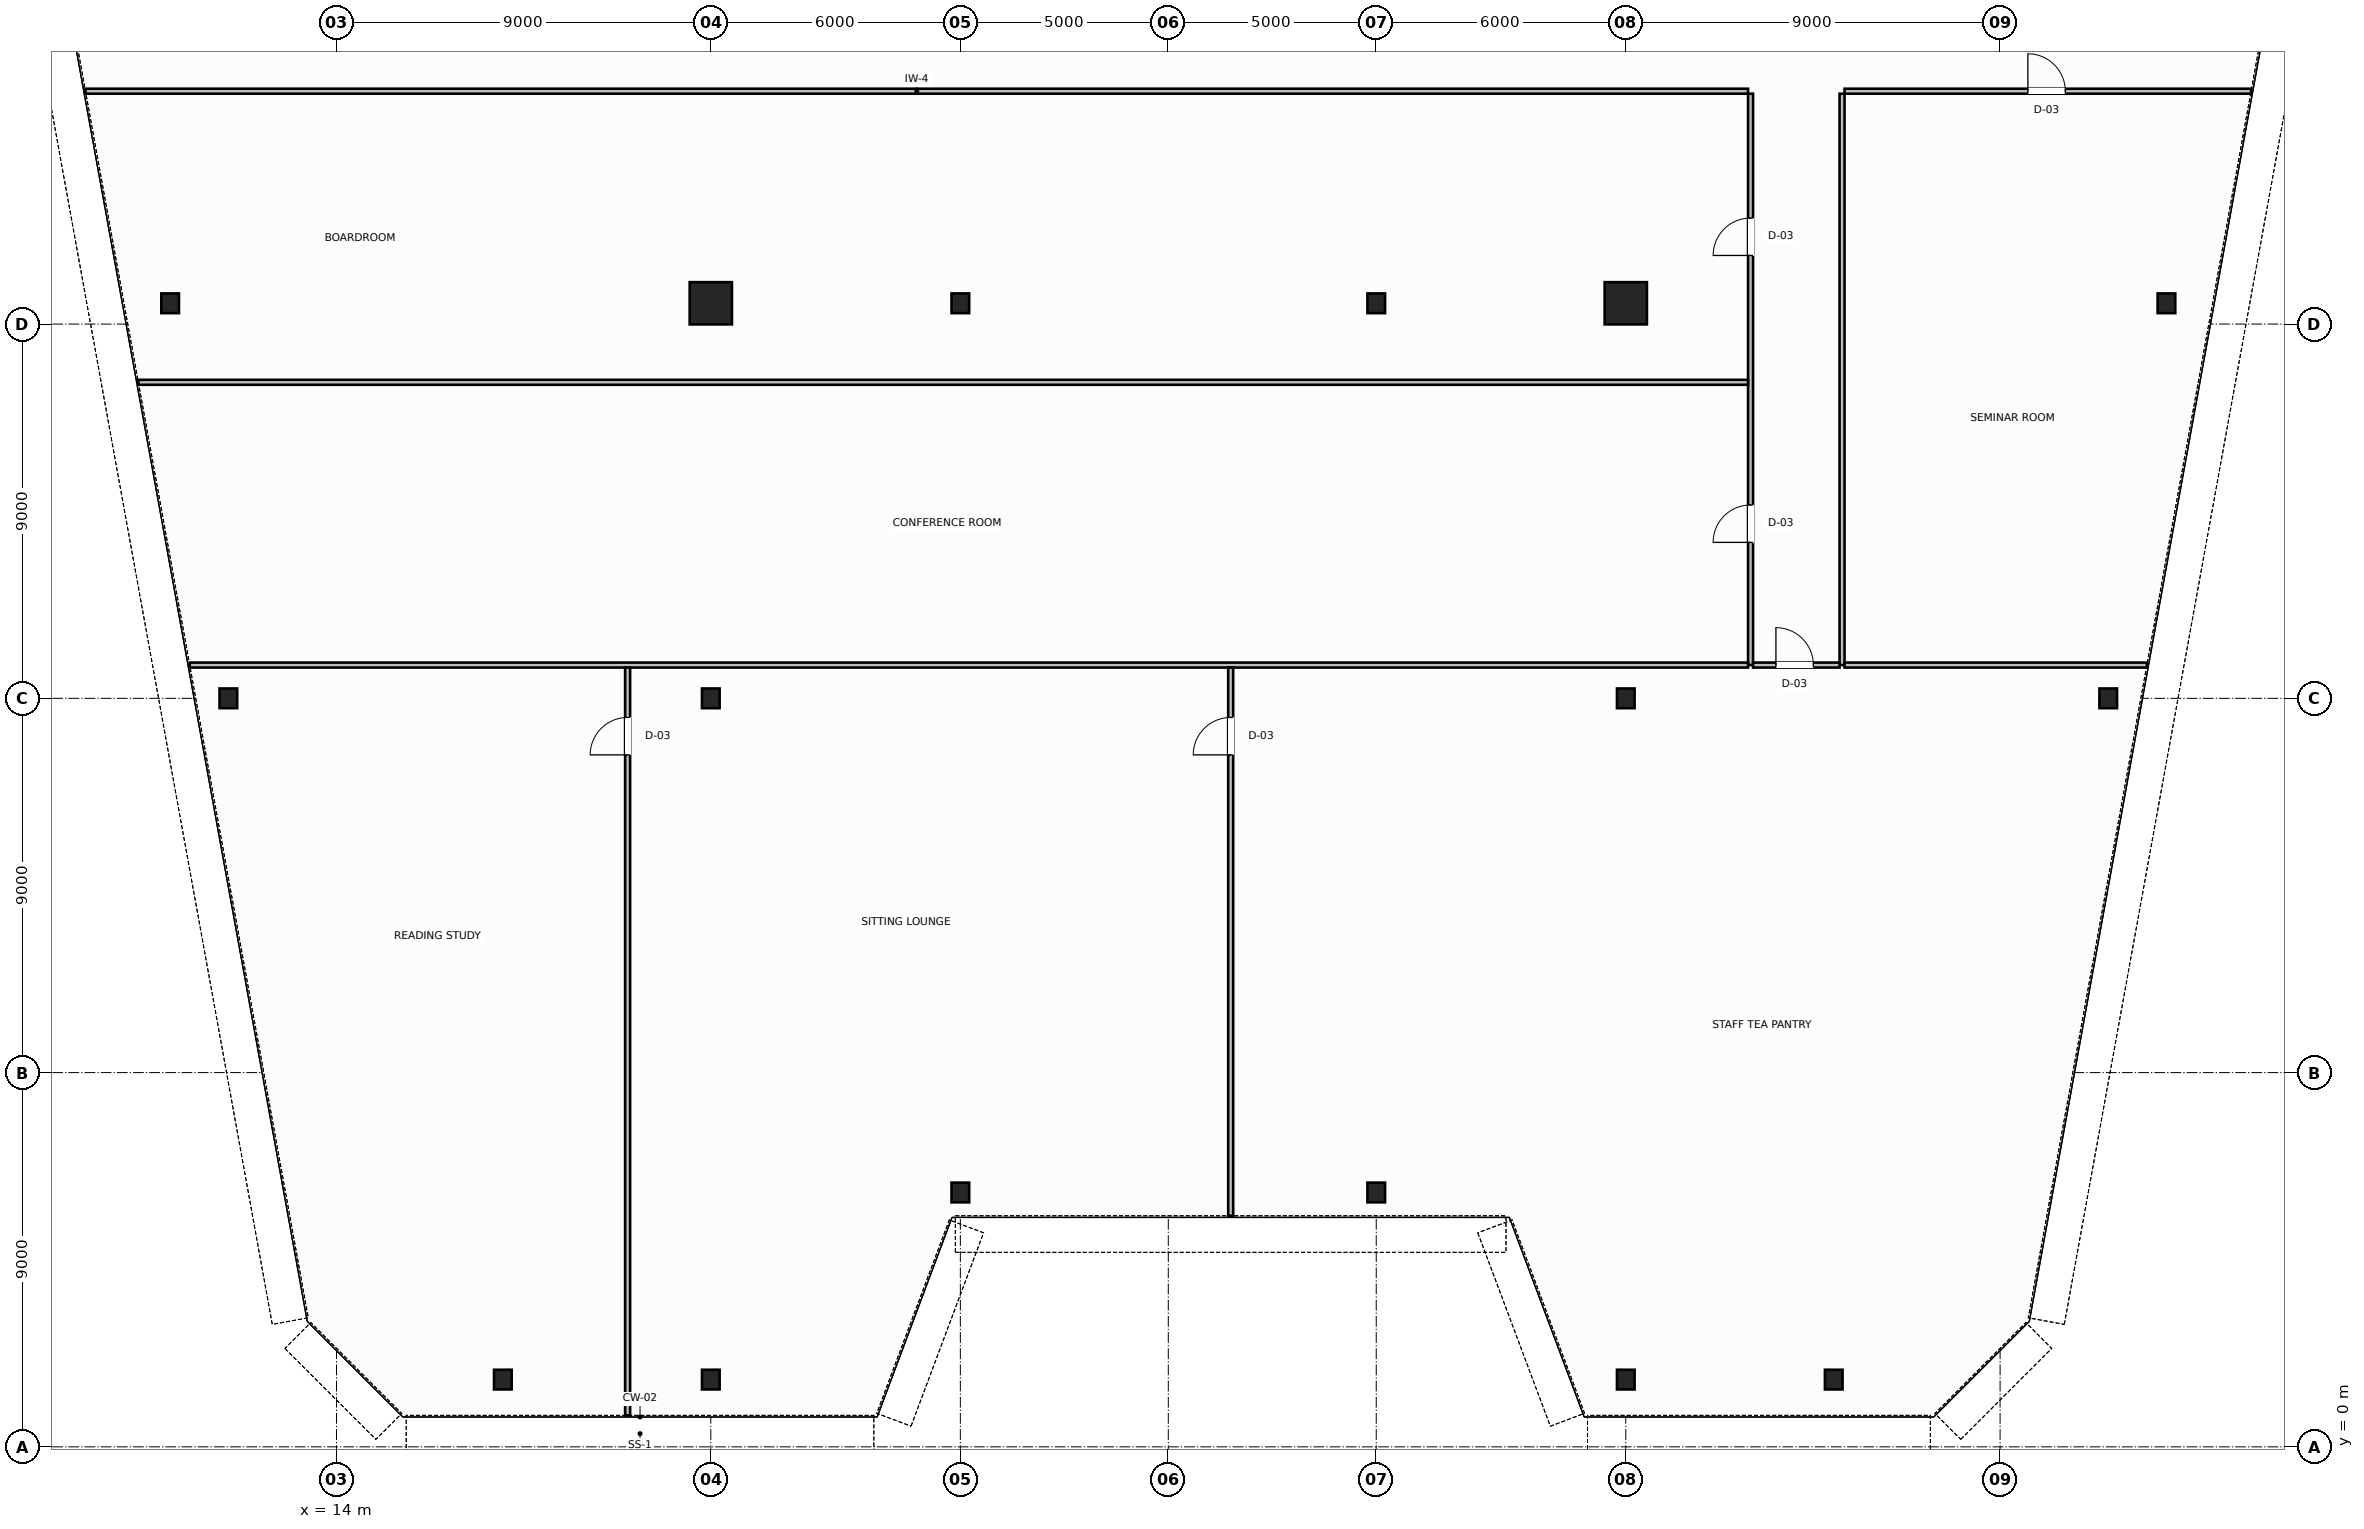
"""IFC4 building model, lengths in metres.
Left out: names, types, materials, properties, quantities, classifications, styles, units other than length and angle.
Written with IfcOpenShell. Run it as: python <this file> out.ifc"""

import sys

from ifc_helpers import new_model, si_unit, direction, frame, frame_2d, origin, origin_2d, place, context, subcontext, project, spatial, rectangle, hollow_circle, i_section, extrude, source, transform, mapped, element, fill, save


model = new_model("IFC4")
c1 = context("Model", 3, precision=1e-05, world=origin(), true_north=direction((0.0, 1.0)))
c2 = subcontext(c1, "Body", "Model", "MODEL_VIEW")
j1 = project(units=[si_unit("LENGTHUNIT", "METRE"), si_unit("PLANEANGLEUNIT", "RADIAN")], contexts=[c1])
p1 = place(None, origin())
s1 = spatial("IfcSite", under=j1, at=p1, CompositionType="ELEMENT")
p2 = place(p1, origin())
s2 = spatial("IfcBuilding", under=s1, at=p2, CompositionType="ELEMENT")
p3 = place(p2, frame((0.0, 0.0, 133.8)))
s3 = spatial("IfcBuildingStorey", under=s2, at=p3, CompositionType="ELEMENT", Elevation=133.8)
m1 = source(origin(), c2, "Body", "SweptSolid", [
    extrude(i_section(OverallWidth=0.424, OverallDepth=0.474, WebThickness=0.047, FlangeThickness=0.065, FilletRadius=0.015, at=origin_2d()), origin(), (0.0, 0.0, 1.0), 3.8),
])
for number, where, z_axis, x_axis in (
    (1, (10.0, 27.5, 0.0), (0.0, 0.0, 1.0), (1.0, 0.0, 0.0)),
    (2, (11.4, 18.0, 0.0), (0.0, 0.0, 1.0), (1.0, 0.0, 0.0)),
    (3, (58.0, 27.5, 0.0), (0.0, 0.0, 1.0), (1.0, 0.0, 0.0)),
    (4, (56.6, 18.0, 0.0), (0.0, 0.0, 1.0), (1.0, 0.0, 0.0)),
):
    element("IfcColumn", number, at=place(p3, frame(where, z_axis=z_axis, x_axis=x_axis)), inside=s3, PredefinedType="COLUMN", context=c2, shape_type="MappedRepresentation", body=[
        mapped(m1, transform((0.0, 0.0, 0.0), scale=1.0)),
    ])
m2 = source(origin(), c2, "Body", "SweptSolid", [
    extrude(hollow_circle(Radius=0.508, WallThickness=0.045, at=origin_2d()), origin(), (0.0, 0.0, 1.0), 3.8),
])
p4 = place(p3, frame((23.0, 27.5, 0.0), z_axis=(0.0, 0.0, 1.0), x_axis=(1.0, 0.0, 0.0)))
e5 = element("IfcColumn", 5, at=p4, inside=s3, PredefinedType="COLUMN", context=c2, shape_type="MappedRepresentation", body=[
    mapped(m2, transform((0.0, 0.0, 0.0), scale=1.0)),
])
m3 = source(origin(), c2, "Body", "SweptSolid", [
    extrude(i_section(OverallWidth=0.424, OverallDepth=0.474, WebThickness=0.047, FlangeThickness=0.065, FilletRadius=0.015, at=origin_2d()), origin(), (0.0, 0.0, 1.0), 3.8),
])
for number, where, z_axis, x_axis in (
    (6, (29.0, 27.5, 0.0), (0.0, 0.0, 1.0), (1.0, 0.0, 0.0)),
    (7, (39.0, 27.5, 0.0), (0.0, 0.0, 1.0), (1.0, 0.0, 0.0)),
):
    element("IfcColumn", number, at=place(p3, frame(where, z_axis=z_axis, x_axis=x_axis)), inside=s3, PredefinedType="COLUMN", context=c2, shape_type="MappedRepresentation", body=[
        mapped(m3, transform((0.0, 0.0, 0.0), scale=1.0)),
    ])
p5 = place(p3, frame((45.0, 27.5, 0.0), z_axis=(0.0, 0.0, 1.0), x_axis=(1.0, 0.0, 0.0)))
e8 = element("IfcColumn", 8, at=p5, inside=s3, PredefinedType="COLUMN", context=c2, shape_type="MappedRepresentation", body=[
    mapped(m2, transform((0.0, 0.0, 0.0), scale=1.0)),
])
for number, where, z_axis, x_axis in (
    (9, (23.0, 18.0, 0.0), (0.0, 0.0, 1.0), (1.0, 0.0, 0.0)),
    (10, (45.0, 18.0, 0.0), (0.0, 0.0, 1.0), (1.0, 0.0, 0.0)),
):
    element("IfcColumn", number, at=place(p3, frame(where, z_axis=z_axis, x_axis=x_axis)), inside=s3, PredefinedType="COLUMN", context=c2, shape_type="MappedRepresentation", body=[
        mapped(m3, transform((0.0, 0.0, 0.0), scale=1.0)),
    ])
m4 = source(origin(), c2, "Body", "SweptSolid", [
    extrude(i_section(OverallWidth=0.424, OverallDepth=0.474, WebThickness=0.047, FlangeThickness=0.065, FilletRadius=0.015, at=origin_2d()), origin(), (0.0, 0.0, 1.0), 3.744),
])
for number, where, z_axis, x_axis in (
    (11, (18.0, 1.617, 0.032), (0.0, -0.064, 0.998), (1.0, 0.0, 0.0)),
    (12, (23.0, 1.617, 0.032), (0.0, -0.064, 0.998), (1.0, 0.0, 0.0)),
    (13, (29.0, 6.117, 0.032), (0.0, -0.064, 0.998), (1.0, 0.0, 0.0)),
    (14, (39.0, 6.117, 0.032), (0.0, -0.064, 0.998), (1.0, 0.0, 0.0)),
    (15, (45.0, 1.617, 0.032), (0.0, -0.064, 0.998), (1.0, 0.0, 0.0)),
    (16, (50.0, 1.617, 0.032), (0.0, -0.064, 0.998), (1.0, 0.0, 0.0)),
):
    element("IfcColumn", number, at=place(p3, frame(where, z_axis=z_axis, x_axis=x_axis)), inside=s3, PredefinedType="COLUMN", context=c2, shape_type="MappedRepresentation", body=[
        mapped(m4, transform((0.0, 0.0, 0.0), scale=1.0)),
    ])
p6 = place(p3, frame((7.964, 32.6, 0.0), z_axis=(0.0, 0.0, 1.0), x_axis=(1.0, 0.0, 0.0)))
e17 = element("IfcWall", 17, at=p6, inside=s3, PredefinedType="PARTITIONING", context=c2, shape_type="SweptSolid", body=[
    extrude(rectangle(XDim=39.976, YDim=0.12, at=frame_2d((19.988, 0.0))), origin(), (0.0, 0.0, 1.0), 3.58),
])
p7 = place(p3, frame((50.26, 32.6, 0.0), z_axis=(0.0, 0.0, 1.0), x_axis=(1.0, 0.0, 0.0)))
e18 = element("IfcWall", 18, at=p7, inside=s3, PredefinedType="PARTITIONING", context=c2, shape_type="SweptSolid", body=[
    extrude(rectangle(XDim=9.776, YDim=0.12, at=frame_2d((4.888, 0.0))), origin(), (0.0, 0.0, 1.0), 3.58),
])
p8 = place(p7, frame((4.408, 0.0, 0.0)))
e19 = element("IfcOpeningElement", 19, at=p8, cuts=e18, PredefinedType="OPENING", context=c2, shape_type="SweptSolid", body=[
    extrude(rectangle(XDim=0.9, YDim=2.15, at=frame_2d((0.45, 1.075))), frame((0.0, 0.07, 0.0), z_axis=(0.0, -1.0, 0.0), x_axis=(1.0, 0.0, 0.0)), (0.0, 0.0, 1.0), 0.14),
])
p9 = place(p3, frame((48.0, 18.8, 0.0), z_axis=(0.0, 0.0, 1.0), x_axis=(0.0, 1.0, 0.0)))
e20 = element("IfcWall", 20, at=p9, inside=s3, PredefinedType="PARTITIONING", context=c2, shape_type="SweptSolid", body=[
    extrude(rectangle(XDim=13.74, YDim=0.12, at=frame_2d((6.87, 0.0))), origin(), (0.0, 0.0, 1.0), 3.58),
])
p10 = place(p9, frame((2.95, 0.0, 0.0)))
e21 = element("IfcOpeningElement", 21, at=p10, cuts=e20, PredefinedType="OPENING", context=c2, shape_type="SweptSolid", body=[
    extrude(rectangle(XDim=0.9, YDim=2.15, at=frame_2d((0.45, 1.075))), frame((0.0, 0.07, 0.0), z_axis=(0.0, -1.0, 0.0), x_axis=(1.0, 0.0, 0.0)), (0.0, 0.0, 1.0), 0.14),
])
p11 = place(p9, frame((9.85, 0.0, 0.0)))
e22 = element("IfcOpeningElement", 22, at=p11, cuts=e20, PredefinedType="OPENING", context=c2, shape_type="SweptSolid", body=[
    extrude(rectangle(XDim=0.9, YDim=2.15, at=frame_2d((0.45, 1.075))), frame((0.0, 0.07, 0.0), z_axis=(0.0, -1.0, 0.0), x_axis=(1.0, 0.0, 0.0)), (0.0, 0.0, 1.0), 0.14),
])
p12 = place(p3, frame((50.2, 18.8, 0.0), z_axis=(0.0, 0.0, 1.0), x_axis=(0.0, 1.0, 0.0)))
e23 = element("IfcWall", 23, at=p12, inside=s3, PredefinedType="PARTITIONING", context=c2, shape_type="SweptSolid", body=[
    extrude(rectangle(XDim=13.74, YDim=0.12, at=frame_2d((6.87, 0.0))), origin(), (0.0, 0.0, 1.0), 3.58),
])
p13 = place(p3, frame((48.06, 18.8, 0.0), z_axis=(0.0, 0.0, 1.0), x_axis=(1.0, 0.0, 0.0)))
e24 = element("IfcWall", 24, at=p13, inside=s3, PredefinedType="PARTITIONING", context=c2, shape_type="SweptSolid", body=[
    extrude(rectangle(XDim=2.08, YDim=0.12, at=frame_2d((1.04, 0.0))), origin(), (0.0, 0.0, 1.0), 3.58),
])
p14 = place(p13, frame((0.55, 0.0, 0.0)))
e25 = element("IfcOpeningElement", 25, at=p14, cuts=e24, PredefinedType="OPENING", context=c2, shape_type="SweptSolid", body=[
    extrude(rectangle(XDim=0.9, YDim=2.15, at=frame_2d((0.45, 1.075))), frame((0.0, 0.07, 0.0), z_axis=(0.0, -1.0, 0.0), x_axis=(1.0, 0.0, 0.0)), (0.0, 0.0, 1.0), 0.14),
])
p15 = place(p3, frame((10.47, 18.8, 0.0), z_axis=(0.0, 0.0, 1.0), x_axis=(1.0, 0.0, 0.0)))
e26 = element("IfcWall", 26, at=p15, inside=s3, PredefinedType="PARTITIONING", context=c2, shape_type="SweptSolid", body=[
    extrude(rectangle(XDim=37.47, YDim=0.12, at=frame_2d((18.735, 0.0))), origin(), (0.0, 0.0, 1.0), 3.58),
])
p16 = place(p3, frame((50.26, 18.8, 0.0), z_axis=(0.0, 0.0, 1.0), x_axis=(1.0, 0.0, 0.0)))
e27 = element("IfcWall", 27, at=p16, inside=s3, PredefinedType="PARTITIONING", context=c2, shape_type="SweptSolid", body=[
    extrude(rectangle(XDim=7.27, YDim=0.12, at=frame_2d((3.635, 0.0))), origin(), (0.0, 0.0, 1.0), 3.58),
])
p17 = place(p3, frame((21.0, 0.757, 0.0), z_axis=(0.0, 0.0, 1.0), x_axis=(0.0, 1.0, 0.0)))
e28 = element("IfcWall", 28, at=p17, inside=s3, PredefinedType="PARTITIONING", context=c2, shape_type="SweptSolid", body=[
    extrude(rectangle(XDim=17.983, YDim=0.12, at=frame_2d((8.991, 0.0))), origin(), (0.0, 0.0, 1.0), 3.58),
])
p18 = place(p17, frame((15.883, 0.0, 0.0)))
e29 = element("IfcOpeningElement", 29, at=p18, cuts=e28, PredefinedType="OPENING", context=c2, shape_type="SweptSolid", body=[
    extrude(rectangle(XDim=0.9, YDim=2.15, at=frame_2d((0.45, 1.075))), frame((0.0, 0.07, 0.0), z_axis=(0.0, -1.0, 0.0), x_axis=(1.0, 0.0, 0.0)), (0.0, 0.0, 1.0), 0.14),
])
p19 = place(p3, frame((35.5, 5.557, 0.0), z_axis=(0.0, 0.0, 1.0), x_axis=(0.0, 1.0, 0.0)))
e30 = element("IfcWall", 30, at=p19, inside=s3, PredefinedType="PARTITIONING", context=c2, shape_type="SweptSolid", body=[
    extrude(rectangle(XDim=13.183, YDim=0.12, at=frame_2d((6.591, 0.0))), origin(), (0.0, 0.0, 1.0), 3.58),
])
p20 = place(p19, frame((11.083, 0.0, 0.0)))
e31 = element("IfcOpeningElement", 31, at=p20, cuts=e30, PredefinedType="OPENING", context=c2, shape_type="SweptSolid", body=[
    extrude(rectangle(XDim=0.9, YDim=2.15, at=frame_2d((0.45, 1.075))), frame((0.0, 0.07, 0.0), z_axis=(0.0, -1.0, 0.0), x_axis=(1.0, 0.0, 0.0)), (0.0, 0.0, 1.0), 0.14),
])
p21 = place(p3, frame((9.235, 25.6, 0.0), z_axis=(0.0, 0.0, 1.0), x_axis=(1.0, 0.0, 0.0)))
e32 = element("IfcWall", 32, at=p21, inside=s3, PredefinedType="PARTITIONING", context=c2, shape_type="SweptSolid", body=[
    extrude(rectangle(XDim=38.705, YDim=0.12, at=frame_2d((19.352, 0.0))), origin(), (0.0, 0.0, 1.0), 3.58),
])
m5 = source(origin(), c2, "Body", "SweptSolid", [
    extrude(rectangle(XDim=0.9, YDim=2.15, at=frame_2d((0.45, 1.075))), frame((0.0, 0.025, 0.0), z_axis=(0.0, -1.0, 0.0), x_axis=(1.0, 0.0, 0.0)), (0.0, 0.0, 1.0), 0.05),
])
p22 = place(p18, origin())
e33 = element("IfcDoor", 33, at=p22, inside=s3, OperationType="SINGLE_SWING_RIGHT", PredefinedType="DOOR", context=c2, shape_type="MappedRepresentation", body=[
    mapped(m5, transform((0.0, 0.0, 0.0), scale=1.0)),
])
fill(e29, e33)
p23 = place(p20, origin())
e34 = element("IfcDoor", 34, at=p23, inside=s3, OperationType="SINGLE_SWING_LEFT", PredefinedType="DOOR", context=c2, shape_type="MappedRepresentation", body=[
    mapped(m5, transform((0.0, 0.0, 0.0), scale=1.0)),
])
fill(e31, e34)
p24 = place(p14, origin())
e35 = element("IfcDoor", 35, at=p24, inside=s3, OperationType="SINGLE_SWING_LEFT", PredefinedType="DOOR", context=c2, shape_type="MappedRepresentation", body=[
    mapped(m5, transform((0.0, 0.0, 0.0), scale=1.0)),
])
fill(e25, e35)
p25 = place(p10, origin())
e36 = element("IfcDoor", 36, at=p25, inside=s3, OperationType="SINGLE_SWING_LEFT", PredefinedType="DOOR", context=c2, shape_type="MappedRepresentation", body=[
    mapped(m5, transform((0.0, 0.0, 0.0), scale=1.0)),
])
fill(e21, e36)
p26 = place(p11, origin())
e37 = element("IfcDoor", 37, at=p26, inside=s3, OperationType="SINGLE_SWING_RIGHT", PredefinedType="DOOR", context=c2, shape_type="MappedRepresentation", body=[
    mapped(m5, transform((0.0, 0.0, 0.0), scale=1.0)),
])
fill(e22, e37)
p27 = place(p8, origin())
e38 = element("IfcDoor", 38, at=p27, inside=s3, OperationType="SINGLE_SWING_RIGHT", PredefinedType="DOOR", context=c2, shape_type="MappedRepresentation", body=[
    mapped(m5, transform((0.0, 0.0, 0.0), scale=1.0)),
])
fill(e19, e38)
save(model, sys.argv[1])
